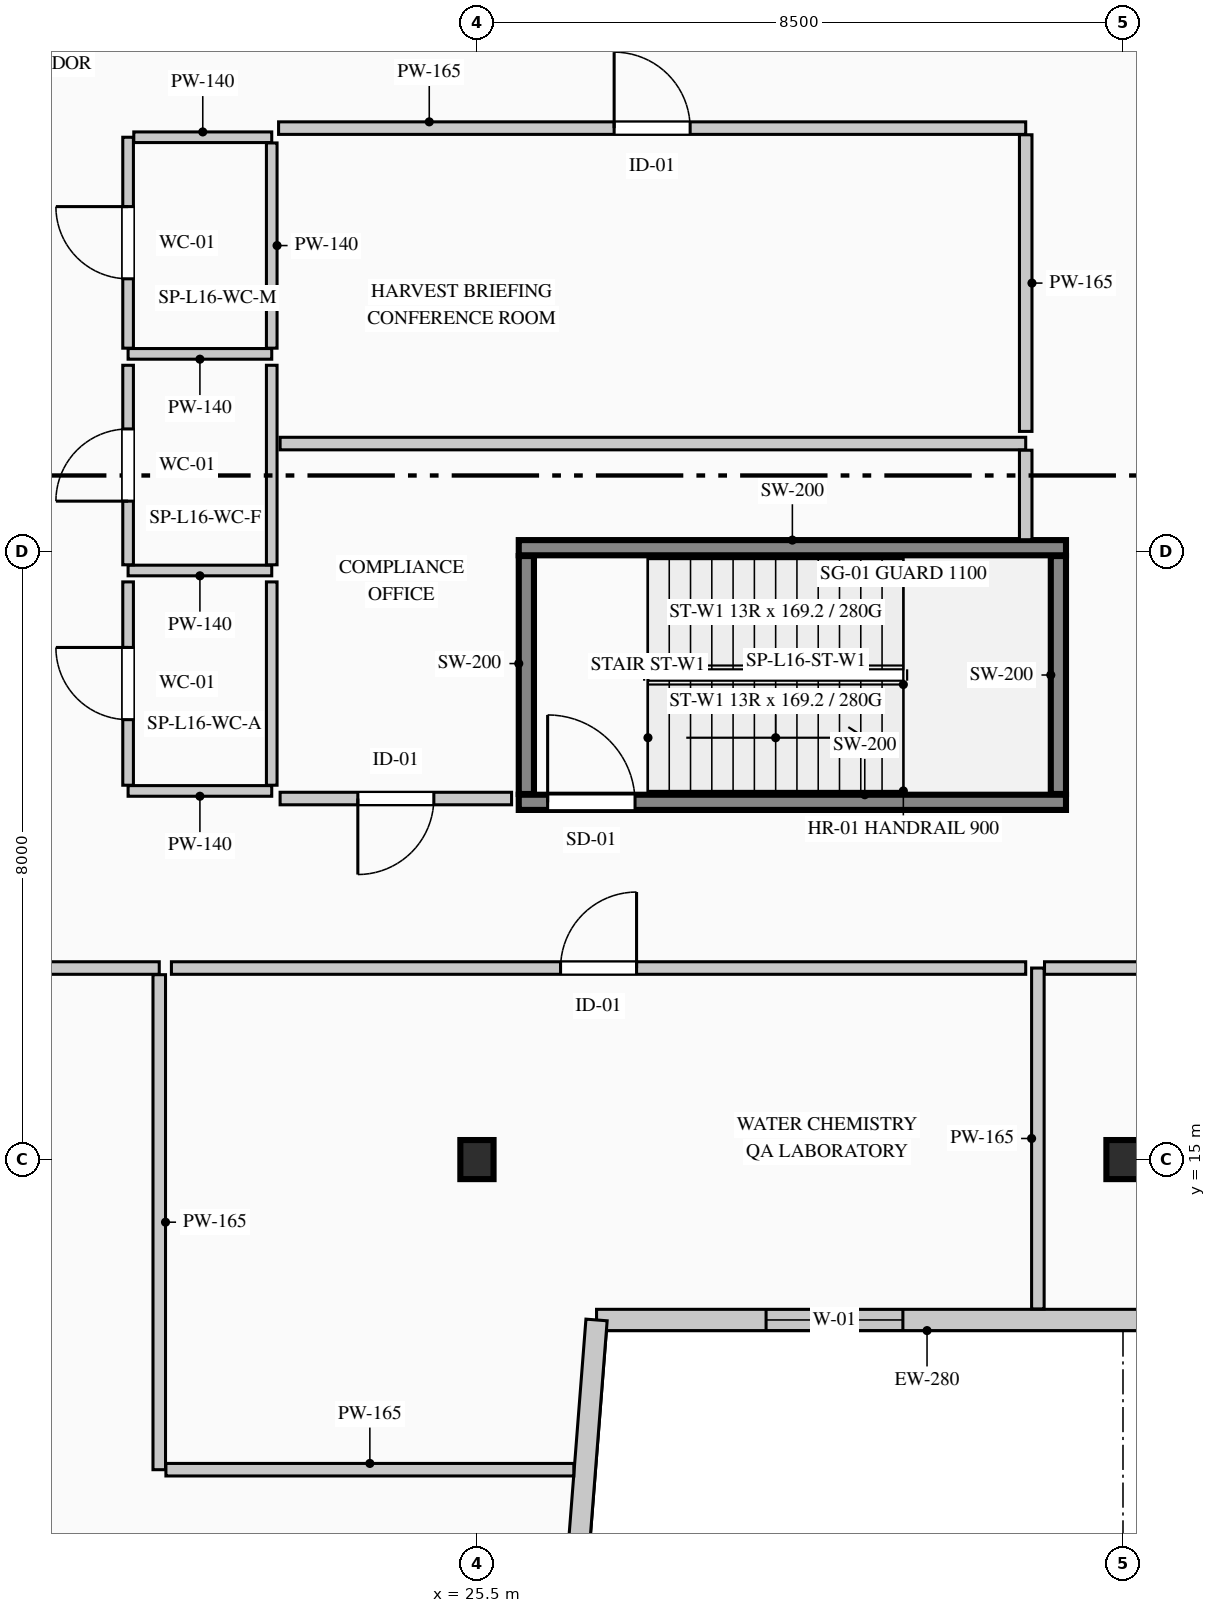
"""IFC4 building model, lengths in metres.
Left out: names, types, materials, properties, quantities, classifications, styles, units other than length and angle.
Written with IfcOpenShell. Run it as: python <this file> out.ifc"""

import sys

from ifc_helpers import new_model, si_unit, direction, frame, frame_2d, origin, origin_2d, place, context, subcontext, project, spatial, rectangle, i_section, extrude, element, fill, save


model = new_model("IFC4")
c1 = context("Model", 3, precision=1e-05, world=origin(), true_north=direction((0.0, 1.0)))
c2 = subcontext(c1, "Body", "Model", "MODEL_VIEW")
j1 = project(units=[si_unit("LENGTHUNIT", "METRE"), si_unit("PLANEANGLEUNIT", "RADIAN")], contexts=[c1])
p1 = place(None, origin())
s1 = spatial("IfcSite", under=j1, at=p1, CompositionType="ELEMENT")
p2 = place(p1, origin())
s2 = spatial("IfcBuilding", under=s1, at=p2, CompositionType="ELEMENT")
p3 = place(p2, frame((0.0, 0.0, 71.0)))
s3 = spatial("IfcBuildingStorey", under=s2, at=p3, CompositionType="ELEMENT", Elevation=71.0)
p4 = place(p3, frame((26.05, 19.7, 0.0), z_axis=(0.0, 0.0, 1.0), x_axis=(1.0, 0.0, 0.0)))
e1 = element("IfcWall", 1, at=p4, inside=s3, PredefinedType="SHEAR", context=c2, shape_type="SweptSolid", body=[
    extrude(rectangle(XDim=7.2, YDim=0.2, at=frame_2d((3.6, 0.0))), origin(), (0.0, 0.0, 1.0), 4.4),
])
p5 = place(p4, frame((0.38, 0.0, 0.0)))
e2 = element("IfcOpeningElement", 2, at=p5, cuts=e1, PredefinedType="OPENING", context=c2, shape_type="SweptSolid", body=[
    extrude(rectangle(XDim=1.15, YDim=2.2, at=frame_2d((0.575, 1.1))), frame((0.0, 0.11, 0.0), z_axis=(0.0, -1.0, 0.0), x_axis=(1.0, 0.0, 0.0)), (0.0, 0.0, 1.0), 0.22),
])
p6 = place(p3, frame((26.05, 23.05, 0.0), z_axis=(0.0, 0.0, 1.0), x_axis=(1.0, 0.0, 0.0)))
e3 = element("IfcWall", 3, at=p6, inside=s3, PredefinedType="SHEAR", context=c2, shape_type="SweptSolid", body=[
    extrude(rectangle(XDim=7.2, YDim=0.2, at=frame_2d((3.6, 0.0))), origin(), (0.0, 0.0, 1.0), 4.4),
])
for number, where, z_axis, x_axis in (
    (4, (26.15, 19.81, 0.0), (0.0, 0.0, 1.0), (0.0, 1.0, 0.0)),
    (5, (33.15, 19.81, 0.0), (0.0, 0.0, 1.0), (0.0, 1.0, 0.0)),
):
    element("IfcWall", number, at=place(p3, frame(where, z_axis=z_axis, x_axis=x_axis)), inside=s3, PredefinedType="SHEAR", context=c2, shape_type="SweptSolid", body=[
        extrude(rectangle(XDim=3.13, YDim=0.2, at=frame_2d((1.565, 0.0))), origin(), (0.0, 0.0, 1.0), 4.4),
    ])
for number, where, z_axis, x_axis in (
    (6, (25.5, 15.0, 0.0), (0.0, 0.0, 1.0), (1.0, 0.0, 0.0)),
    (7, (34.0, 15.0, 0.0), (0.0, 0.0, 1.0), (1.0, 0.0, 0.0)),
):
    element("IfcColumn", number, at=place(p3, frame(where, z_axis=z_axis, x_axis=x_axis)), inside=s3, PredefinedType="COLUMN", context=c2, shape_type="SweptSolid", body=[
        extrude(i_section(OverallWidth=0.437, OverallDepth=0.514, WebThickness=0.061, FlangeThickness=0.077, FilletRadius=0.015, at=origin_2d()), origin(), (0.0, 0.0, 1.0), 4.4),
    ])
p7 = place(p3, frame((35.77, 12.89, 0.0), z_axis=(0.0, 0.0, 1.0), x_axis=(-1.0, 0.0, 0.0)))
e8 = element("IfcWall", 8, at=p7, inside=s3, PredefinedType="STANDARD", context=c2, shape_type="SweptSolid", body=[
    extrude(rectangle(XDim=8.697, YDim=0.28, at=frame_2d((4.348, 0.0))), origin(), (0.0, 0.0, 1.0), 4.1),
])
p8 = place(p7, frame((4.666, 0.0, 0.9)))
e9 = element("IfcOpeningElement", 9, at=p8, cuts=e8, PredefinedType="OPENING", context=c2, shape_type="SweptSolid", body=[
    extrude(rectangle(XDim=1.8, YDim=2.1, at=frame_2d((0.9, 1.05))), frame((0.0, 0.15, 0.0), z_axis=(0.0, -1.0, 0.0), x_axis=(1.0, 0.0, 0.0)), (0.0, 0.0, 1.0), 0.3),
])
p9 = place(p3, frame((27.073, 12.89, 0.0), z_axis=(0.0, 0.0, 1.0), x_axis=(-0.077816860153, -0.996967670627, 0.0)))
e10 = element("IfcWall", 10, at=p9, inside=s3, PredefinedType="STANDARD", context=c2, shape_type="SweptSolid", body=[
    extrude(rectangle(XDim=10.281, YDim=0.28, at=frame_2d((5.141, 0.0))), origin(), (0.0, 0.0, 1.0), 4.1),
])
p10 = place(p3, frame((22.8, 25.6, 0.0), z_axis=(0.0, 0.0, 1.0), x_axis=(-1.0, 0.0, 0.0)))
e11 = element("IfcWall", 11, at=p10, inside=s3, PredefinedType="PARTITIONING", context=c2, shape_type="SweptSolid", body=[
    extrude(rectangle(XDim=1.89, YDim=0.14, at=frame_2d((0.945, 0.0))), origin(), (0.0, 0.0, 1.0), 4.1),
])
p11 = place(p3, frame((20.91, 25.675, 0.0), z_axis=(0.0, 0.0, 1.0), x_axis=(0.0, 1.0, 0.0)))
e12 = element("IfcWall", 12, at=p11, inside=s3, PredefinedType="PARTITIONING", context=c2, shape_type="SweptSolid", body=[
    extrude(rectangle(XDim=2.775, YDim=0.14, at=frame_2d((1.387, 0.0))), origin(), (0.0, 0.0, 1.0), 4.1),
])
p12 = place(p11, frame((0.913, 0.0, 0.0)))
e13 = element("IfcOpeningElement", 13, at=p12, cuts=e12, PredefinedType="OPENING", context=c2, shape_type="SweptSolid", body=[
    extrude(rectangle(XDim=0.95, YDim=2.15, at=frame_2d((0.475, 1.075))), frame((0.0, 0.08, 0.0), z_axis=(0.0, -1.0, 0.0), x_axis=(1.0, 0.0, 0.0)), (0.0, 0.0, 1.0), 0.16),
])
p13 = place(p3, frame((20.985, 28.45, 0.0), z_axis=(0.0, 0.0, 1.0), x_axis=(1.0, 0.0, 0.0)))
e14 = element("IfcWall", 14, at=p13, inside=s3, PredefinedType="PARTITIONING", context=c2, shape_type="SweptSolid", body=[
    extrude(rectangle(XDim=1.815, YDim=0.14, at=frame_2d((0.907, 0.0))), origin(), (0.0, 0.0, 1.0), 4.1),
])
p14 = place(p3, frame((22.8, 28.375, 0.0), z_axis=(0.0, 0.0, 1.0), x_axis=(0.0, -1.0, 0.0)))
e15 = element("IfcWall", 15, at=p14, inside=s3, PredefinedType="PARTITIONING", context=c2, shape_type="SweptSolid", body=[
    extrude(rectangle(XDim=2.7, YDim=0.14, at=frame_2d((1.35, 0.0))), origin(), (0.0, 0.0, 1.0), 3.725),
])
p15 = place(p3, frame((22.8, 22.75, 0.0), z_axis=(0.0, 0.0, 1.0), x_axis=(-1.0, 0.0, 0.0)))
e16 = element("IfcWall", 16, at=p15, inside=s3, PredefinedType="PARTITIONING", context=c2, shape_type="SweptSolid", body=[
    extrude(rectangle(XDim=1.89, YDim=0.14, at=frame_2d((0.945, 0.0))), origin(), (0.0, 0.0, 1.0), 4.1),
])
p16 = place(p3, frame((20.91, 22.825, 0.0), z_axis=(0.0, 0.0, 1.0), x_axis=(0.0, 1.0, 0.0)))
e17 = element("IfcWall", 17, at=p16, inside=s3, PredefinedType="PARTITIONING", context=c2, shape_type="SweptSolid", body=[
    extrude(rectangle(XDim=2.625, YDim=0.14, at=frame_2d((1.312, 0.0))), origin(), (0.0, 0.0, 1.0), 4.1),
])
p17 = place(p16, frame((0.837, 0.0, 0.0)))
e18 = element("IfcOpeningElement", 18, at=p17, cuts=e17, PredefinedType="OPENING", context=c2, shape_type="SweptSolid", body=[
    extrude(rectangle(XDim=0.95, YDim=2.15, at=frame_2d((0.475, 1.075))), frame((0.0, 0.08, 0.0), z_axis=(0.0, -1.0, 0.0), x_axis=(1.0, 0.0, 0.0)), (0.0, 0.0, 1.0), 0.16),
])
p18 = place(p3, frame((22.8, 25.45, 0.0), z_axis=(0.0, 0.0, 1.0), x_axis=(0.0, -1.0, 0.0)))
e19 = element("IfcWall", 19, at=p18, inside=s3, PredefinedType="PARTITIONING", context=c2, shape_type="SweptSolid", body=[
    extrude(rectangle(XDim=2.625, YDim=0.14, at=frame_2d((1.312, 0.0))), origin(), (0.0, 0.0, 1.0), 3.725),
])
p19 = place(p3, frame((22.8, 19.85, 0.0), z_axis=(0.0, 0.0, 1.0), x_axis=(-1.0, 0.0, 0.0)))
e20 = element("IfcWall", 20, at=p19, inside=s3, PredefinedType="PARTITIONING", context=c2, shape_type="SweptSolid", body=[
    extrude(rectangle(XDim=1.89, YDim=0.14, at=frame_2d((0.945, 0.0))), origin(), (0.0, 0.0, 1.0), 4.1),
])
p20 = place(p3, frame((20.91, 19.925, 0.0), z_axis=(0.0, 0.0, 1.0), x_axis=(0.0, 1.0, 0.0)))
e21 = element("IfcWall", 21, at=p20, inside=s3, PredefinedType="PARTITIONING", context=c2, shape_type="SweptSolid", body=[
    extrude(rectangle(XDim=2.675, YDim=0.14, at=frame_2d((1.337, 0.0))), origin(), (0.0, 0.0, 1.0), 4.1),
])
p21 = place(p20, frame((0.863, 0.0, 0.0)))
e22 = element("IfcOpeningElement", 22, at=p21, cuts=e21, PredefinedType="OPENING", context=c2, shape_type="SweptSolid", body=[
    extrude(rectangle(XDim=0.95, YDim=2.15, at=frame_2d((0.475, 1.075))), frame((0.0, 0.08, 0.0), z_axis=(0.0, -1.0, 0.0), x_axis=(1.0, 0.0, 0.0)), (0.0, 0.0, 1.0), 0.16),
])
p22 = place(p3, frame((22.8, 22.6, 0.0), z_axis=(0.0, 0.0, 1.0), x_axis=(0.0, -1.0, 0.0)))
e23 = element("IfcWall", 23, at=p22, inside=s3, PredefinedType="PARTITIONING", context=c2, shape_type="SweptSolid", body=[
    extrude(rectangle(XDim=2.675, YDim=0.14, at=frame_2d((1.337, 0.0))), origin(), (0.0, 0.0, 1.0), 3.725),
])
p23 = place(p3, frame((11.88, 17.52, 0.0), z_axis=(0.0, 0.0, 1.0), x_axis=(1.0, 0.0, 0.0)))
e24 = element("IfcWall", 24, at=p23, inside=s3, PredefinedType="PARTITIONING", context=c2, shape_type="SweptSolid", body=[
    extrude(rectangle(XDim=9.44, YDim=0.165, at=frame_2d((4.72, 0.0))), origin(), (0.0, 0.0, 1.0), 4.1),
])
p24 = place(p23, frame((4.22, 0.0, 0.0)))
e25 = element("IfcOpeningElement", 25, at=p24, cuts=e24, PredefinedType="OPENING", context=c2, shape_type="SweptSolid", body=[
    extrude(rectangle(XDim=1.0, YDim=2.15, at=frame_2d((0.5, 1.075))), frame((0.0, 0.093, 0.0), z_axis=(0.0, -1.0, 0.0), x_axis=(1.0, 0.0, 0.0)), (0.0, 0.0, 1.0), 0.185),
])
p25 = place(p3, frame((21.32, 17.433, 0.0), z_axis=(0.0, 0.0, 1.0), x_axis=(0.0, -1.0, 0.0)))
e26 = element("IfcWall", 26, at=p25, inside=s3, PredefinedType="PARTITIONING", context=c2, shape_type="SweptSolid", body=[
    extrude(rectangle(XDim=6.513, YDim=0.165, at=frame_2d((3.256, 0.0))), origin(), (0.0, 0.0, 1.0), 3.725),
])
p26 = place(p3, frame((21.407, 10.92, 0.0), z_axis=(0.0, 0.0, 1.0), x_axis=(1.0, 0.0, 0.0)))
e27 = element("IfcWall", 27, at=p26, inside=s3, PredefinedType="PARTITIONING", context=c2, shape_type="SweptSolid", body=[
    extrude(rectangle(XDim=5.367, YDim=0.165, at=frame_2d((2.684, 0.0))), origin(), (0.0, 0.0, 1.0), 4.1),
])
p27 = place(p3, frame((32.88, 13.035, 0.0), z_axis=(0.0, 0.0, 1.0), x_axis=(0.0, 1.0, 0.0)))
e28 = element("IfcWall", 28, at=p27, inside=s3, PredefinedType="PARTITIONING", context=c2, shape_type="SweptSolid", body=[
    extrude(rectangle(XDim=4.485, YDim=0.165, at=frame_2d((2.243, 0.0))), origin(), (0.0, 0.0, 1.0), 4.1),
])
p28 = place(p3, frame((32.968, 17.52, 0.0), z_axis=(0.0, 0.0, 1.0), x_axis=(1.0, 0.0, 0.0)))
e29 = element("IfcWall", 29, at=p28, inside=s3, PredefinedType="PARTITIONING", context=c2, shape_type="SweptSolid", body=[
    extrude(rectangle(XDim=12.012, YDim=0.165, at=frame_2d((6.006, 0.0))), origin(), (0.0, 0.0, 1.0), 3.885),
])
p29 = place(p28, frame((5.506, 0.0, 0.0)))
e30 = element("IfcOpeningElement", 30, at=p29, cuts=e29, PredefinedType="OPENING", context=c2, shape_type="SweptSolid", body=[
    extrude(rectangle(XDim=1.0, YDim=2.15, at=frame_2d((0.5, 1.075))), frame((0.0, 0.093, 0.0), z_axis=(0.0, -1.0, 0.0), x_axis=(1.0, 0.0, 0.0)), (0.0, 0.0, 1.0), 0.185),
])
p30 = place(p3, frame((21.48, 17.52, 0.0), z_axis=(0.0, 0.0, 1.0), x_axis=(1.0, 0.0, 0.0)))
e31 = element("IfcWall", 31, at=p30, inside=s3, PredefinedType="PARTITIONING", context=c2, shape_type="SweptSolid", body=[
    extrude(rectangle(XDim=11.24, YDim=0.165, at=frame_2d((5.62, 0.0))), origin(), (0.0, 0.0, 1.0), 3.885),
])
p31 = place(p30, frame((5.12, 0.0, 0.0)))
e32 = element("IfcOpeningElement", 32, at=p31, cuts=e31, PredefinedType="OPENING", context=c2, shape_type="SweptSolid", body=[
    extrude(rectangle(XDim=1.0, YDim=2.15, at=frame_2d((0.5, 1.075))), frame((0.0, 0.093, 0.0), z_axis=(0.0, -1.0, 0.0), x_axis=(1.0, 0.0, 0.0)), (0.0, 0.0, 1.0), 0.185),
])
p32 = place(p3, frame((25.956, 19.75, 0.0), z_axis=(0.0, 0.0, 1.0), x_axis=(-1.0, 0.0, 0.0)))
e33 = element("IfcWall", 33, at=p32, inside=s3, PredefinedType="PARTITIONING", context=c2, shape_type="SweptSolid", body=[
    extrude(rectangle(XDim=3.046, YDim=0.165, at=frame_2d((1.523, 0.0))), origin(), (0.0, 0.0, 1.0), 4.1),
])
p33 = place(p32, frame((1.023, 0.0, 0.0)))
e34 = element("IfcOpeningElement", 34, at=p33, cuts=e33, PredefinedType="OPENING", context=c2, shape_type="SweptSolid", body=[
    extrude(rectangle(XDim=1.0, YDim=2.15, at=frame_2d((0.5, 1.075))), frame((0.0, 0.093, 0.0), z_axis=(0.0, -1.0, 0.0), x_axis=(1.0, 0.0, 0.0)), (0.0, 0.0, 1.0), 0.185),
])
p34 = place(p3, frame((22.91, 24.42, 0.0), z_axis=(0.0, 0.0, 1.0), x_axis=(1.0, 0.0, 0.0)))
e35 = element("IfcWall", 35, at=p34, inside=s3, PredefinedType="PARTITIONING", context=c2, shape_type="SweptSolid", body=[
    extrude(rectangle(XDim=9.81, YDim=0.165, at=frame_2d((4.905, 0.0))), origin(), (0.0, 0.0, 1.0), 3.725),
])
p35 = place(p3, frame((32.72, 24.333, 0.0), z_axis=(0.0, 0.0, 1.0), x_axis=(0.0, -1.0, 0.0)))
e36 = element("IfcWall", 36, at=p35, inside=s3, PredefinedType="PARTITIONING", context=c2, shape_type="SweptSolid", body=[
    extrude(rectangle(XDim=1.177, YDim=0.165, at=frame_2d((0.589, 0.0))), origin(), (0.0, 0.0, 1.0), 4.1),
])
p36 = place(p3, frame((22.89, 28.57, 0.0), z_axis=(0.0, 0.0, 1.0), x_axis=(1.0, 0.0, 0.0)))
e37 = element("IfcWall", 37, at=p36, inside=s3, PredefinedType="PARTITIONING", context=c2, shape_type="SweptSolid", body=[
    extrude(rectangle(XDim=9.83, YDim=0.165, at=frame_2d((4.915, 0.0))), origin(), (0.0, 0.0, 1.0), 3.885),
])
p37 = place(p36, frame((4.415, 0.0, 0.0)))
e38 = element("IfcOpeningElement", 38, at=p37, cuts=e37, PredefinedType="OPENING", context=c2, shape_type="SweptSolid", body=[
    extrude(rectangle(XDim=1.0, YDim=2.15, at=frame_2d((0.5, 1.075))), frame((0.0, 0.093, 0.0), z_axis=(0.0, -1.0, 0.0), x_axis=(1.0, 0.0, 0.0)), (0.0, 0.0, 1.0), 0.185),
])
p38 = place(p3, frame((32.72, 28.482, 0.0), z_axis=(0.0, 0.0, 1.0), x_axis=(0.0, -1.0, 0.0)))
e39 = element("IfcWall", 39, at=p38, inside=s3, PredefinedType="PARTITIONING", context=c2, shape_type="SweptSolid", body=[
    extrude(rectangle(XDim=3.902, YDim=0.165, at=frame_2d((1.951, 0.0))), origin(), (0.0, 0.0, 1.0), 4.1),
])
p39 = place(p8, origin())
e40 = element("IfcWindow", 40, at=p39, inside=s3, PartitioningType="SINGLE_PANEL", PredefinedType="WINDOW", context=c2, shape_type="SweptSolid", body=[
    extrude(rectangle(XDim=1.8, YDim=2.1, at=frame_2d((0.9, 1.05))), frame((0.0, 0.03, 0.0), z_axis=(0.0, -1.0, 0.0), x_axis=(1.0, 0.0, 0.0)), (0.0, 0.0, 1.0), 0.06),
])
fill(e9, e40)
p40 = place(p5, origin())
e41 = element("IfcDoor", 41, at=p40, inside=s3, OperationType="SINGLE_SWING_LEFT", PredefinedType="DOOR", context=c2, shape_type="SweptSolid", body=[
    extrude(rectangle(XDim=1.15, YDim=2.2, at=frame_2d((0.575, 1.1))), frame((0.0, 0.025, 0.0), z_axis=(0.0, -1.0, 0.0), x_axis=(1.0, 0.0, 0.0)), (0.0, 0.0, 1.0), 0.05),
])
fill(e2, e41)
p41 = place(p12, origin())
e42 = element("IfcDoor", 42, at=p41, inside=s3, OperationType="SINGLE_SWING_RIGHT", PredefinedType="DOOR", context=c2, shape_type="SweptSolid", body=[
    extrude(rectangle(XDim=0.95, YDim=2.15, at=frame_2d((0.475, 1.075))), frame((0.0, 0.025, 0.0), z_axis=(0.0, -1.0, 0.0), x_axis=(1.0, 0.0, 0.0)), (0.0, 0.0, 1.0), 0.05),
])
fill(e13, e42)
p42 = place(p17, origin())
e43 = element("IfcDoor", 43, at=p42, inside=s3, OperationType="SINGLE_SWING_LEFT", PredefinedType="DOOR", context=c2, shape_type="SweptSolid", body=[
    extrude(rectangle(XDim=0.95, YDim=2.15, at=frame_2d((0.475, 1.075))), frame((0.0, 0.025, 0.0), z_axis=(0.0, -1.0, 0.0), x_axis=(1.0, 0.0, 0.0)), (0.0, 0.0, 1.0), 0.05),
])
fill(e18, e43)
p43 = place(p21, origin())
e44 = element("IfcDoor", 44, at=p43, inside=s3, OperationType="SINGLE_SWING_RIGHT", PredefinedType="DOOR", context=c2, shape_type="SweptSolid", body=[
    extrude(rectangle(XDim=0.95, YDim=2.15, at=frame_2d((0.475, 1.075))), frame((0.0, 0.025, 0.0), z_axis=(0.0, -1.0, 0.0), x_axis=(1.0, 0.0, 0.0)), (0.0, 0.0, 1.0), 0.05),
])
fill(e22, e44)
p44 = place(p31, origin())
e45 = element("IfcDoor", 45, at=p44, inside=s3, OperationType="SINGLE_SWING_RIGHT", PredefinedType="DOOR", context=c2, shape_type="SweptSolid", body=[
    extrude(rectangle(XDim=1.0, YDim=2.15, at=frame_2d((0.5, 1.075))), frame((0.0, 0.025, 0.0), z_axis=(0.0, -1.0, 0.0), x_axis=(1.0, 0.0, 0.0)), (0.0, 0.0, 1.0), 0.05),
])
fill(e32, e45)
p45 = place(p33, origin())
e46 = element("IfcDoor", 46, at=p45, inside=s3, OperationType="SINGLE_SWING_RIGHT", PredefinedType="DOOR", context=c2, shape_type="SweptSolid", body=[
    extrude(rectangle(XDim=1.0, YDim=2.15, at=frame_2d((0.5, 1.075))), frame((0.0, 0.025, 0.0), z_axis=(0.0, -1.0, 0.0), x_axis=(1.0, 0.0, 0.0)), (0.0, 0.0, 1.0), 0.05),
])
fill(e34, e46)
p46 = place(p37, origin())
e47 = element("IfcDoor", 47, at=p46, inside=s3, OperationType="SINGLE_SWING_LEFT", PredefinedType="DOOR", context=c2, shape_type="SweptSolid", body=[
    extrude(rectangle(XDim=1.0, YDim=2.15, at=frame_2d((0.5, 1.075))), frame((0.0, 0.025, 0.0), z_axis=(0.0, -1.0, 0.0), x_axis=(1.0, 0.0, 0.0)), (0.0, 0.0, 1.0), 0.05),
])
fill(e38, e47)
save(model, sys.argv[1])
